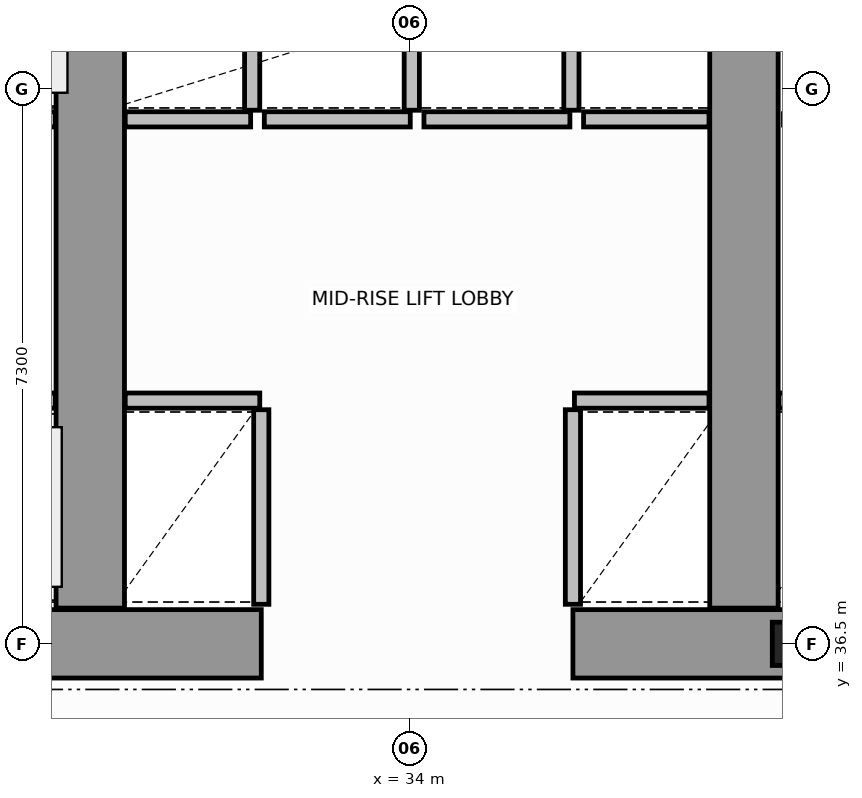
"""IFC4 building model, lengths in metres.
Left out: names, types, materials, properties, quantities, classifications, styles, units other than length and angle.
Written with IfcOpenShell. Run it as: python <this file> out.ifc"""

import sys

from ifc_helpers import new_model, si_unit, direction, frame, frame_2d, origin, origin_2d, place, context, subcontext, project, spatial, rectangle, i_section, extrude, source, transform, mapped, element, save


model = new_model("IFC4")
c1 = context("Model", 3, precision=1e-05, world=origin(), true_north=direction((0.0, 1.0)))
c2 = subcontext(c1, "Body", "Model", "MODEL_VIEW")
j1 = project(units=[si_unit("LENGTHUNIT", "METRE"), si_unit("PLANEANGLEUNIT", "RADIAN")], contexts=[c1])
p1 = place(None, origin())
s1 = spatial("IfcSite", under=j1, at=p1, CompositionType="ELEMENT")
p2 = place(p1, origin())
s2 = spatial("IfcBuilding", under=s1, at=p2, CompositionType="ELEMENT")
p3 = place(p2, frame((0.0, 0.0, 41.6)))
s3 = spatial("IfcBuildingStorey", under=s2, at=p3, CompositionType="ELEMENT", Elevation=41.6)
m1 = source(origin(), c2, "Body", "SweptSolid", [
    extrude(i_section(OverallWidth=0.454, OverallDepth=0.569, WebThickness=0.078, FlangeThickness=0.08, FilletRadius=0.015, at=origin_2d()), origin(), (0.0, 0.0, 1.0), 3.8),
])
p4 = place(p3, frame((39.0, 36.5, 0.0), z_axis=(0.0, 0.0, 1.0), x_axis=(1.0, 0.0, 0.0)))
e1 = element("IfcColumn", 1, at=p4, inside=s3, PredefinedType="COLUMN", context=c2, shape_type="MappedRepresentation", body=[
    mapped(m1, transform((0.0, 0.0, 0.0), scale=1.0)),
])
for number, where, z_axis, x_axis in (
    (2, (27.55, 36.5, 0.0), (0.0, 0.0, 1.0), (1.0, 0.0, 0.0)),
    (3, (36.15, 36.5, 0.0), (0.0, 0.0, 1.0), (1.0, 0.0, 0.0)),
):
    element("IfcWall", number, at=place(p3, frame(where, z_axis=z_axis, x_axis=x_axis)), inside=s3, PredefinedType="SHEAR", context=c2, shape_type="SweptSolid", body=[
        extrude(rectangle(XDim=4.5, YDim=0.9, at=frame_2d((2.25, 0.0))), origin(), (0.0, 0.0, 1.0), 3.8),
    ])
for number, where, z_axis, x_axis in (
    (4, (29.8, 36.97, 0.0), (0.0, 0.0, 1.0), (0.0, 1.0, 0.0)),
    (5, (38.4, 36.97, 0.0), (0.0, 0.0, 1.0), (0.0, 1.0, 0.0)),
):
    element("IfcWall", number, at=place(p3, frame(where, z_axis=z_axis, x_axis=x_axis)), inside=s3, PredefinedType="SHEAR", context=c2, shape_type="SweptSolid", body=[
        extrude(rectangle(XDim=9.23, YDim=0.9, at=frame_2d((4.615, 0.0))), origin(), (0.0, 0.0, 1.0), 3.8),
    ])
p5 = place(p3, frame((27.57, 39.7, 0.0), z_axis=(0.0, 0.0, 1.0), x_axis=(1.0, 0.0, 0.0)))
e6 = element("IfcWall", 6, at=p5, inside=s3, PredefinedType="SOLIDWALL", context=c2, shape_type="SweptSolid", body=[
    extrude(rectangle(XDim=1.77, YDim=0.2, at=frame_2d((0.885, 0.0))), origin(), (0.0, 0.0, 1.0), 3.58),
])
p6 = place(p5, frame((0.335, 0.0, 0.0)))
e7 = element("IfcOpeningElement", 7, at=p6, cuts=e6, PredefinedType="OPENING", context=c2, shape_type="SweptSolid", body=[
    extrude(rectangle(XDim=1.1, YDim=2.15, at=frame_2d((0.55, 1.075))), frame((0.0, 0.11, 0.0), z_axis=(0.0, -1.0, 0.0), x_axis=(1.0, 0.0, 0.0)), (0.0, 0.0, 1.0), 0.22),
])
p7 = place(p3, frame((27.69, 43.4, 0.0), z_axis=(0.0, 0.0, 1.0), x_axis=(1.0, 0.0, 0.0)))
e8 = element("IfcWall", 8, at=p7, inside=s3, PredefinedType="SOLIDWALL", context=c2, shape_type="SweptSolid", body=[
    extrude(rectangle(XDim=1.65, YDim=0.2, at=frame_2d((0.825, 0.0))), origin(), (0.0, 0.0, 1.0), 3.58),
])
p8 = place(p7, frame((0.275, 0.0, 0.0)))
e9 = element("IfcOpeningElement", 9, at=p8, cuts=e8, PredefinedType="OPENING", context=c2, shape_type="SweptSolid", body=[
    extrude(rectangle(XDim=1.1, YDim=2.15, at=frame_2d((0.55, 1.075))), frame((0.0, 0.11, 0.0), z_axis=(0.0, -1.0, 0.0), x_axis=(1.0, 0.0, 0.0)), (0.0, 0.0, 1.0), 0.22),
])
p9 = place(p3, frame((30.26, 39.7, 0.0), z_axis=(0.0, 0.0, 1.0), x_axis=(1.0, 0.0, 0.0)))
e10 = element("IfcWall", 10, at=p9, inside=s3, PredefinedType="SOLIDWALL", context=c2, shape_type="SweptSolid", body=[
    extrude(rectangle(XDim=1.77, YDim=0.2, at=frame_2d((0.885, 0.0))), origin(), (0.0, 0.0, 1.0), 3.58),
])
p10 = place(p3, frame((32.05, 37.02, 0.0), z_axis=(0.0, 0.0, 1.0), x_axis=(0.0, 1.0, 0.0)))
e11 = element("IfcWall", 11, at=p10, inside=s3, PredefinedType="SOLIDWALL", context=c2, shape_type="SweptSolid", body=[
    extrude(rectangle(XDim=2.56, YDim=0.2, at=frame_2d((1.28, 0.0))), origin(), (0.0, 0.0, 1.0), 3.58),
])
p11 = place(p3, frame((36.17, 39.7, 0.0), z_axis=(0.0, 0.0, 1.0), x_axis=(1.0, 0.0, 0.0)))
e12 = element("IfcWall", 12, at=p11, inside=s3, PredefinedType="SOLIDWALL", context=c2, shape_type="SweptSolid", body=[
    extrude(rectangle(XDim=1.77, YDim=0.2, at=frame_2d((0.885, 0.0))), origin(), (0.0, 0.0, 1.0), 3.58),
])
p12 = place(p3, frame((36.15, 37.02, 0.0), z_axis=(0.0, 0.0, 1.0), x_axis=(0.0, 1.0, 0.0)))
e13 = element("IfcWall", 13, at=p12, inside=s3, PredefinedType="SOLIDWALL", context=c2, shape_type="SweptSolid", body=[
    extrude(rectangle(XDim=2.56, YDim=0.2, at=frame_2d((1.28, 0.0))), origin(), (0.0, 0.0, 1.0), 3.58),
])
p13 = place(p3, frame((30.26, 43.4, 0.0), z_axis=(0.0, 0.0, 1.0), x_axis=(1.0, 0.0, 0.0)))
e14 = element("IfcWall", 14, at=p13, inside=s3, PredefinedType="SOLIDWALL", context=c2, shape_type="SweptSolid", body=[
    extrude(rectangle(XDim=1.65, YDim=0.2, at=frame_2d((0.825, 0.0))), origin(), (0.0, 0.0, 1.0), 3.58),
])
p14 = place(p3, frame((31.93, 43.52, 0.0), z_axis=(0.0, 0.0, 1.0), x_axis=(0.0, 1.0, 0.0)))
e15 = element("IfcWall", 15, at=p14, inside=s3, PredefinedType="SOLIDWALL", context=c2, shape_type="SweptSolid", body=[
    extrude(rectangle(XDim=2.56, YDim=0.2, at=frame_2d((1.28, 0.0))), origin(), (0.0, 0.0, 1.0), 3.58),
])
p15 = place(p3, frame((32.09, 43.4, 0.0), z_axis=(0.0, 0.0, 1.0), x_axis=(1.0, 0.0, 0.0)))
e16 = element("IfcWall", 16, at=p15, inside=s3, PredefinedType="SOLIDWALL", context=c2, shape_type="SweptSolid", body=[
    extrude(rectangle(XDim=1.92, YDim=0.2, at=frame_2d((0.96, 0.0))), origin(), (0.0, 0.0, 1.0), 3.58),
])
p16 = place(p3, frame((34.03, 43.52, 0.0), z_axis=(0.0, 0.0, 1.0), x_axis=(0.0, 1.0, 0.0)))
e17 = element("IfcWall", 17, at=p16, inside=s3, PredefinedType="SOLIDWALL", context=c2, shape_type="SweptSolid", body=[
    extrude(rectangle(XDim=2.56, YDim=0.2, at=frame_2d((1.28, 0.0))), origin(), (0.0, 0.0, 1.0), 3.58),
])
p17 = place(p3, frame((34.19, 43.4, 0.0), z_axis=(0.0, 0.0, 1.0), x_axis=(1.0, 0.0, 0.0)))
e18 = element("IfcWall", 18, at=p17, inside=s3, PredefinedType="SOLIDWALL", context=c2, shape_type="SweptSolid", body=[
    extrude(rectangle(XDim=1.92, YDim=0.2, at=frame_2d((0.96, 0.0))), origin(), (0.0, 0.0, 1.0), 3.58),
])
p18 = place(p3, frame((36.13, 43.52, 0.0), z_axis=(0.0, 0.0, 1.0), x_axis=(0.0, 1.0, 0.0)))
e19 = element("IfcWall", 19, at=p18, inside=s3, PredefinedType="SOLIDWALL", context=c2, shape_type="SweptSolid", body=[
    extrude(rectangle(XDim=2.56, YDim=0.2, at=frame_2d((1.28, 0.0))), origin(), (0.0, 0.0, 1.0), 3.58),
])
p19 = place(p3, frame((36.29, 43.4, 0.0), z_axis=(0.0, 0.0, 1.0), x_axis=(1.0, 0.0, 0.0)))
e20 = element("IfcWall", 20, at=p19, inside=s3, PredefinedType="SOLIDWALL", context=c2, shape_type="SweptSolid", body=[
    extrude(rectangle(XDim=1.65, YDim=0.2, at=frame_2d((0.825, 0.0))), origin(), (0.0, 0.0, 1.0), 3.58),
])
p20 = place(p3, frame((38.86, 39.7, 0.0), z_axis=(0.0, 0.0, 1.0), x_axis=(1.0, 0.0, 0.0)))
e21 = element("IfcWall", 21, at=p20, inside=s3, PredefinedType="SOLIDWALL", context=c2, shape_type="SweptSolid", body=[
    extrude(rectangle(XDim=1.77, YDim=0.2, at=frame_2d((0.885, 0.0))), origin(), (0.0, 0.0, 1.0), 3.58),
])
save(model, sys.argv[1])
